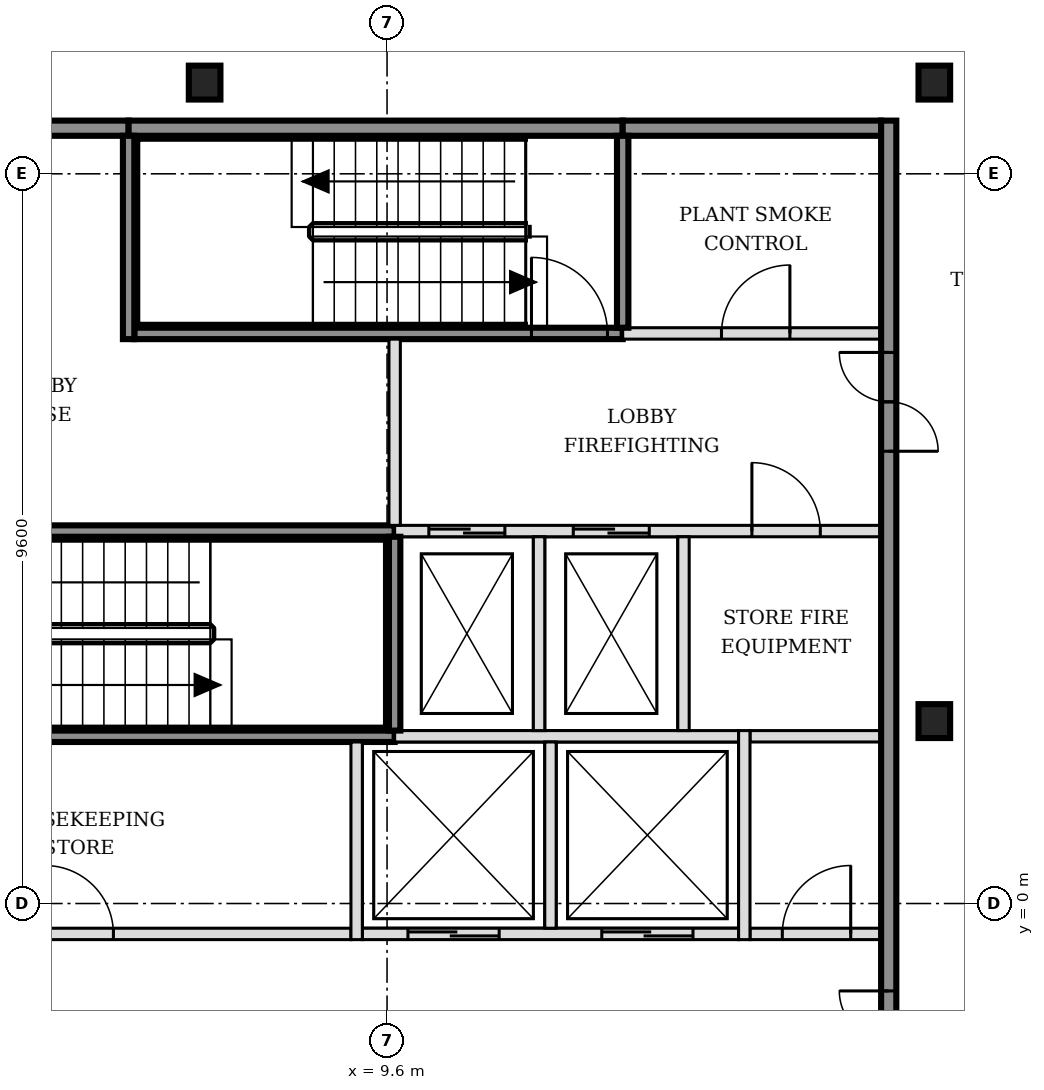
"""IFC4 building model, lengths in metres.
Left out: names, types, materials, properties, quantities, classifications, styles, units other than length and angle.
Written with IfcOpenShell. Run it as: python <this file> out.ifc"""

import sys

from ifc_helpers import new_model, si_unit, direction, frame, frame_2d, origin, origin_2d, place, context, subcontext, project, spatial, rectangle, i_section, extrude, element, fill, save


model = new_model("IFC4")
c1 = context("Model", 3, precision=1e-05, world=origin(), true_north=direction((0.0, 1.0)))
c2 = subcontext(c1, "Body", "Model", "MODEL_VIEW")
j1 = project(units=[si_unit("LENGTHUNIT", "METRE"), si_unit("PLANEANGLEUNIT", "RADIAN")], contexts=[c1])
p1 = place(None, origin())
s1 = spatial("IfcSite", under=j1, at=p1, CompositionType="ELEMENT")
p2 = place(p1, origin())
s2 = spatial("IfcBuilding", under=s1, at=p2, CompositionType="ELEMENT")
p3 = place(p2, frame((0.0, 0.0, 154.2)))
s3 = spatial("IfcBuildingStorey", under=s2, at=p3, CompositionType="ELEMENT", Elevation=154.2)
for number, where, z_axis, x_axis in (
    (1, (16.8, 2.4, -0.15), (0.0, 0.0, 1.0), (1.0, 0.0, 0.0)),
    (2, (7.2, 10.8, -0.15), (0.0, 0.0, 1.0), (1.0, 0.0, 0.0)),
    (3, (16.8, 10.8, -0.15), (0.0, 0.0, 1.0), (1.0, 0.0, 0.0)),
):
    element("IfcColumn", number, at=place(p3, frame(where, z_axis=z_axis, x_axis=x_axis)), inside=s3, PredefinedType="COLUMN", context=c2, shape_type="SweptSolid", body=[
        extrude(i_section(OverallWidth=0.416, OverallDepth=0.446, WebThickness=0.039, FlangeThickness=0.063, FilletRadius=0.015, at=origin_2d()), origin(), (0.0, 0.0, 1.0), 3.6),
    ])
p4 = place(p3, frame((-1.7, -0.4, 0.0), z_axis=(0.0, 0.0, 1.0), x_axis=(1.0, 0.0, 0.0)))
e4 = element("IfcWall", 4, at=p4, inside=s3, PredefinedType="PARTITIONING", context=c2, shape_type="SweptSolid", body=[
    extrude(rectangle(XDim=10.825, YDim=0.15, at=frame_2d((5.413, 0.0))), origin(), (0.0, 0.0, 1.0), 3.45),
])
p5 = place(p4, frame((1.3, 0.0, 0.0)))
e5 = element("IfcOpeningElement", 5, at=p5, cuts=e4, PredefinedType="OPENING", context=c2, shape_type="SweptSolid", body=[
    extrude(rectangle(XDim=0.9, YDim=2.1, at=frame_2d((0.45, 1.05))), frame((0.0, 0.085, 0.0), z_axis=(0.0, -1.0, 0.0), x_axis=(1.0, 0.0, 0.0)), (0.0, 0.0, 1.0), 0.17),
])
p6 = place(p4, frame((6.8, 0.0, 0.0)))
e6 = element("IfcOpeningElement", 6, at=p6, cuts=e4, PredefinedType="OPENING", context=c2, shape_type="SweptSolid", body=[
    extrude(rectangle(XDim=0.9, YDim=2.1, at=frame_2d((0.45, 1.05))), frame((0.0, 0.085, 0.0), z_axis=(0.0, -1.0, 0.0), x_axis=(1.0, 0.0, 0.0)), (0.0, 0.0, 1.0), 0.17),
])
p7 = place(p3, frame((9.275, -0.4, 0.0), z_axis=(0.0, 0.0, 1.0), x_axis=(1.0, 0.0, 0.0)))
e7 = element("IfcWall", 7, at=p7, inside=s3, PredefinedType="SOLIDWALL", context=c2, shape_type="SweptSolid", body=[
    extrude(rectangle(XDim=4.95, YDim=0.15, at=frame_2d((2.475, 0.0))), origin(), (0.0, 0.0, 1.0), 3.45),
])
p8 = place(p7, frame((0.6, 0.0, 0.0)))
e8 = element("IfcOpeningElement", 8, at=p8, cuts=e7, PredefinedType="OPENING", context=c2, shape_type="SweptSolid", body=[
    extrude(rectangle(XDim=1.2, YDim=2.1, at=frame_2d((0.6, 1.05))), frame((0.0, 0.085, 0.0), z_axis=(0.0, -1.0, 0.0), x_axis=(1.0, 0.0, 0.0)), (0.0, 0.0, 1.0), 0.17),
])
p9 = place(p7, frame((3.15, 0.0, 0.0)))
e9 = element("IfcOpeningElement", 9, at=p9, cuts=e7, PredefinedType="OPENING", context=c2, shape_type="SweptSolid", body=[
    extrude(rectangle(XDim=1.2, YDim=2.1, at=frame_2d((0.6, 1.05))), frame((0.0, 0.085, 0.0), z_axis=(0.0, -1.0, 0.0), x_axis=(1.0, 0.0, 0.0)), (0.0, 0.0, 1.0), 0.17),
])
p10 = place(p3, frame((14.375, -0.4, 0.0), z_axis=(0.0, 0.0, 1.0), x_axis=(1.0, 0.0, 0.0)))
e10 = element("IfcWall", 10, at=p10, inside=s3, PredefinedType="PARTITIONING", context=c2, shape_type="SweptSolid", body=[
    extrude(rectangle(XDim=1.725, YDim=0.15, at=frame_2d((0.863, 0.0))), origin(), (0.0, 0.0, 1.0), 3.45),
])
p11 = place(p10, frame((0.425, 0.0, 0.0)))
e11 = element("IfcOpeningElement", 11, at=p11, cuts=e10, PredefinedType="OPENING", context=c2, shape_type="SweptSolid", body=[
    extrude(rectangle(XDim=0.9, YDim=2.1, at=frame_2d((0.45, 1.05))), frame((0.0, 0.085, 0.0), z_axis=(0.0, -1.0, 0.0), x_axis=(1.0, 0.0, 0.0)), (0.0, 0.0, 1.0), 0.17),
])
p12 = place(p3, frame((3.2, 2.2, 0.0), z_axis=(0.0, 0.0, 1.0), x_axis=(1.0, 0.0, 0.0)))
e12 = element("IfcWall", 12, at=p12, inside=s3, PredefinedType="SOLIDWALL", context=c2, shape_type="SweptSolid", body=[
    extrude(rectangle(XDim=6.5, YDim=0.15, at=frame_2d((3.25, 0.0))), origin(), (0.0, 0.0, 1.0), 3.45),
])
p13 = place(p3, frame((9.7, 2.2, 0.0), z_axis=(0.0, 0.0, 1.0), x_axis=(1.0, 0.0, 0.0)))
e13 = element("IfcWall", 13, at=p13, inside=s3, PredefinedType="SOLIDWALL", context=c2, shape_type="SweptSolid", body=[
    extrude(rectangle(XDim=4.525, YDim=0.15, at=frame_2d((2.263, 0.0))), origin(), (0.0, 0.0, 1.0), 3.45),
])
p14 = place(p3, frame((14.375, 2.2, 0.0), z_axis=(0.0, 0.0, 1.0), x_axis=(1.0, 0.0, 0.0)))
e14 = element("IfcWall", 14, at=p14, inside=s3, PredefinedType="PARTITIONING", context=c2, shape_type="SweptSolid", body=[
    extrude(rectangle(XDim=1.725, YDim=0.15, at=frame_2d((0.863, 0.0))), origin(), (0.0, 0.0, 1.0), 3.45),
])
p15 = place(p3, frame((3.2, 4.9, 0.0), z_axis=(0.0, 0.0, 1.0), x_axis=(1.0, 0.0, 0.0)))
e15 = element("IfcWall", 15, at=p15, inside=s3, PredefinedType="SOLIDWALL", context=c2, shape_type="SweptSolid", body=[
    extrude(rectangle(XDim=6.5, YDim=0.15, at=frame_2d((3.25, 0.0))), origin(), (0.0, 0.0, 1.0), 3.45),
])
p16 = place(p15, frame((0.175, 0.0, 0.0)))
e16 = element("IfcOpeningElement", 16, at=p16, cuts=e15, PredefinedType="OPENING", context=c2, shape_type="SweptSolid", body=[
    extrude(rectangle(XDim=1.0, YDim=2.1, at=frame_2d((0.5, 1.05))), frame((0.0, 0.085, 0.0), z_axis=(0.0, -1.0, 0.0), x_axis=(1.0, 0.0, 0.0)), (0.0, 0.0, 1.0), 0.17),
])
p17 = place(p3, frame((9.7, 4.9, 0.0), z_axis=(0.0, 0.0, 1.0), x_axis=(1.0, 0.0, 0.0)))
e17 = element("IfcWall", 17, at=p17, inside=s3, PredefinedType="SOLIDWALL", context=c2, shape_type="SweptSolid", body=[
    extrude(rectangle(XDim=6.4, YDim=0.15, at=frame_2d((3.2, 0.0))), origin(), (0.0, 0.0, 1.0), 3.45),
])
p18 = place(p17, frame((0.45, 0.0, 0.0)))
e18 = element("IfcOpeningElement", 18, at=p18, cuts=e17, PredefinedType="OPENING", context=c2, shape_type="SweptSolid", body=[
    extrude(rectangle(XDim=1.0, YDim=2.1, at=frame_2d((0.5, 1.05))), frame((0.0, 0.085, 0.0), z_axis=(0.0, -1.0, 0.0), x_axis=(1.0, 0.0, 0.0)), (0.0, 0.0, 1.0), 0.17),
])
p19 = place(p17, frame((2.35, 0.0, 0.0)))
e19 = element("IfcOpeningElement", 19, at=p19, cuts=e17, PredefinedType="OPENING", context=c2, shape_type="SweptSolid", body=[
    extrude(rectangle(XDim=1.0, YDim=2.1, at=frame_2d((0.5, 1.05))), frame((0.0, 0.085, 0.0), z_axis=(0.0, -1.0, 0.0), x_axis=(1.0, 0.0, 0.0)), (0.0, 0.0, 1.0), 0.17),
])
p20 = place(p17, frame((4.7, 0.0, 0.0)))
e20 = element("IfcOpeningElement", 20, at=p20, cuts=e17, PredefinedType="OPENING", context=c2, shape_type="SweptSolid", body=[
    extrude(rectangle(XDim=0.9, YDim=2.1, at=frame_2d((0.45, 1.05))), frame((0.0, 0.085, 0.0), z_axis=(0.0, -1.0, 0.0), x_axis=(1.0, 0.0, 0.0)), (0.0, 0.0, 1.0), 0.17),
])
p21 = place(p3, frame((6.275, 7.5, 0.0), z_axis=(0.0, 0.0, 1.0), x_axis=(1.0, 0.0, 0.0)))
e21 = element("IfcWall", 21, at=p21, inside=s3, PredefinedType="SOLIDWALL", context=c2, shape_type="SweptSolid", body=[
    extrude(rectangle(XDim=6.425, YDim=0.15, at=frame_2d((3.212, 0.0))), origin(), (0.0, 0.0, 1.0), 3.45),
])
p22 = place(p21, frame((5.225, 0.0, 0.0)))
e22 = element("IfcOpeningElement", 22, at=p22, cuts=e21, PredefinedType="OPENING", context=c2, shape_type="SweptSolid", body=[
    extrude(rectangle(XDim=1.0, YDim=2.1, at=frame_2d((0.5, 1.05))), frame((0.0, 0.085, 0.0), z_axis=(0.0, -1.0, 0.0), x_axis=(1.0, 0.0, 0.0)), (0.0, 0.0, 1.0), 0.17),
])
p23 = place(p3, frame((12.7, 7.5, 0.0), z_axis=(0.0, 0.0, 1.0), x_axis=(1.0, 0.0, 0.0)))
e23 = element("IfcWall", 23, at=p23, inside=s3, PredefinedType="SOLIDWALL", context=c2, shape_type="SweptSolid", body=[
    extrude(rectangle(XDim=3.4, YDim=0.15, at=frame_2d((1.7, 0.0))), origin(), (0.0, 0.0, 1.0), 3.45),
])
p24 = place(p23, frame((1.3, 0.0, 0.0)))
e24 = element("IfcOpeningElement", 24, at=p24, cuts=e23, PredefinedType="OPENING", context=c2, shape_type="SweptSolid", body=[
    extrude(rectangle(XDim=0.9, YDim=2.1, at=frame_2d((0.45, 1.05))), frame((0.0, 0.085, 0.0), z_axis=(0.0, -1.0, 0.0), x_axis=(1.0, 0.0, 0.0)), (0.0, 0.0, 1.0), 0.17),
])
p25 = place(p3, frame((-1.7, 10.2, 0.0), z_axis=(0.0, 0.0, 1.0), x_axis=(1.0, 0.0, 0.0)))
e25 = element("IfcWall", 25, at=p25, inside=s3, PredefinedType="SOLIDWALL", context=c2, shape_type="SweptSolid", body=[
    extrude(rectangle(XDim=7.9, YDim=0.2, at=frame_2d((3.95, 0.0))), origin(), (0.0, 0.0, 1.0), 3.45),
])
p26 = place(p3, frame((6.2, 10.2, 0.0), z_axis=(0.0, 0.0, 1.0), x_axis=(1.0, 0.0, 0.0)))
e26 = element("IfcWall", 26, at=p26, inside=s3, PredefinedType="SOLIDWALL", context=c2, shape_type="SweptSolid", body=[
    extrude(rectangle(XDim=6.5, YDim=0.2, at=frame_2d((3.25, 0.0))), origin(), (0.0, 0.0, 1.0), 3.45),
])
p27 = place(p3, frame((12.7, 10.2, 0.0), z_axis=(0.0, 0.0, 1.0), x_axis=(1.0, 0.0, 0.0)))
e27 = element("IfcWall", 27, at=p27, inside=s3, PredefinedType="SOLIDWALL", context=c2, shape_type="SweptSolid", body=[
    extrude(rectangle(XDim=3.4, YDim=0.2, at=frame_2d((1.7, 0.0))), origin(), (0.0, 0.0, 1.0), 3.45),
])
p28 = place(p3, frame((6.2, 7.425, 0.0), z_axis=(0.0, 0.0, 1.0), x_axis=(0.0, 1.0, 0.0)))
e28 = element("IfcWall", 28, at=p28, inside=s3, PredefinedType="SOLIDWALL", context=c2, shape_type="SweptSolid", body=[
    extrude(rectangle(XDim=2.675, YDim=0.15, at=frame_2d((1.337, 0.0))), origin(), (0.0, 0.0, 1.0), 3.45),
])
p29 = place(p3, frame((9.2, -0.475, 0.0), z_axis=(0.0, 0.0, 1.0), x_axis=(0.0, 1.0, 0.0)))
e29 = element("IfcWall", 29, at=p29, inside=s3, PredefinedType="SOLIDWALL", context=c2, shape_type="SweptSolid", body=[
    extrude(rectangle(XDim=2.6, YDim=0.15, at=frame_2d((1.3, 0.0))), origin(), (0.0, 0.0, 1.0), 3.45),
])
p30 = place(p3, frame((9.7, 2.275, 0.0), z_axis=(0.0, 0.0, 1.0), x_axis=(0.0, 1.0, 0.0)))
e30 = element("IfcWall", 30, at=p30, inside=s3, PredefinedType="SOLIDWALL", context=c2, shape_type="SweptSolid", body=[
    extrude(rectangle(XDim=2.55, YDim=0.15, at=frame_2d((1.275, 0.0))), origin(), (0.0, 0.0, 1.0), 3.45),
])
p31 = place(p3, frame((9.7, 4.975, 0.0), z_axis=(0.0, 0.0, 1.0), x_axis=(0.0, 1.0, 0.0)))
e31 = element("IfcWall", 31, at=p31, inside=s3, PredefinedType="SOLIDWALL", context=c2, shape_type="SweptSolid", body=[
    extrude(rectangle(XDim=2.45, YDim=0.15, at=frame_2d((1.225, 0.0))), origin(), (0.0, 0.0, 1.0), 3.45),
])
p32 = place(p3, frame((11.6, 2.275, 0.0), z_axis=(0.0, 0.0, 1.0), x_axis=(0.0, 1.0, 0.0)))
e32 = element("IfcWall", 32, at=p32, inside=s3, PredefinedType="SOLIDWALL", context=c2, shape_type="SweptSolid", body=[
    extrude(rectangle(XDim=2.55, YDim=0.15, at=frame_2d((1.275, 0.0))), origin(), (0.0, 0.0, 1.0), 3.45),
])
p33 = place(p3, frame((11.75, -0.325, 0.0), z_axis=(0.0, 0.0, 1.0), x_axis=(0.0, 1.0, 0.0)))
e33 = element("IfcWall", 33, at=p33, inside=s3, PredefinedType="SOLIDWALL", context=c2, shape_type="SweptSolid", body=[
    extrude(rectangle(XDim=2.45, YDim=0.15, at=frame_2d((1.225, 0.0))), origin(), (0.0, 0.0, 1.0), 3.45),
])
p34 = place(p3, frame((12.7, 7.575, 0.0), z_axis=(0.0, 0.0, 1.0), x_axis=(0.0, 1.0, 0.0)))
e34 = element("IfcWall", 34, at=p34, inside=s3, PredefinedType="SOLIDWALL", context=c2, shape_type="SweptSolid", body=[
    extrude(rectangle(XDim=2.525, YDim=0.15, at=frame_2d((1.263, 0.0))), origin(), (0.0, 0.0, 1.0), 3.45),
])
p35 = place(p3, frame((13.5, 2.275, 0.0), z_axis=(0.0, 0.0, 1.0), x_axis=(0.0, 1.0, 0.0)))
e35 = element("IfcWall", 35, at=p35, inside=s3, PredefinedType="SOLIDWALL", context=c2, shape_type="SweptSolid", body=[
    extrude(rectangle(XDim=2.55, YDim=0.15, at=frame_2d((1.275, 0.0))), origin(), (0.0, 0.0, 1.0), 3.45),
])
p36 = place(p3, frame((14.3, -0.475, 0.0), z_axis=(0.0, 0.0, 1.0), x_axis=(0.0, 1.0, 0.0)))
e36 = element("IfcWall", 36, at=p36, inside=s3, PredefinedType="SOLIDWALL", context=c2, shape_type="SweptSolid", body=[
    extrude(rectangle(XDim=2.75, YDim=0.15, at=frame_2d((1.375, 0.0))), origin(), (0.0, 0.0, 1.0), 3.45),
])
p37 = place(p3, frame((16.2, -5.5, 0.0), z_axis=(0.0, 0.0, 1.0), x_axis=(0.0, 1.0, 0.0)))
e37 = element("IfcWall", 37, at=p37, inside=s3, PredefinedType="SOLIDWALL", context=c2, shape_type="SweptSolid", body=[
    extrude(rectangle(XDim=15.8, YDim=0.2, at=frame_2d((7.9, 0.0))), origin(), (0.0, 0.0, 1.0), 3.45),
])
p38 = place(p37, frame((3.05, 0.0, 0.0)))
e38 = element("IfcOpeningElement", 38, at=p38, cuts=e37, PredefinedType="OPENING", context=c2, shape_type="SweptSolid", body=[
    extrude(rectangle(XDim=1.3, YDim=2.1, at=frame_2d((0.65, 1.05))), frame((0.0, 0.11, 0.0), z_axis=(0.0, -1.0, 0.0), x_axis=(1.0, 0.0, 0.0)), (0.0, 0.0, 1.0), 0.22),
])
p39 = place(p37, frame((11.45, 0.0, 0.0)))
e39 = element("IfcOpeningElement", 39, at=p39, cuts=e37, PredefinedType="OPENING", context=c2, shape_type="SweptSolid", body=[
    extrude(rectangle(XDim=1.3, YDim=2.1, at=frame_2d((0.65, 1.05))), frame((0.0, 0.11, 0.0), z_axis=(0.0, -1.0, 0.0), x_axis=(1.0, 0.0, 0.0)), (0.0, 0.0, 1.0), 0.22),
])
p40 = place(p3, frame((26.272, 9.522, 0.0), z_axis=(0.0, 0.0, 1.0), x_axis=(-0.707097742657, 0.707115819601, 0.0)))
e40 = element("IfcWall", 40, at=p40, inside=s3, PredefinedType="PARTITIONING", context=c2, shape_type="SweptSolid", body=[
    extrude(rectangle(XDim=13.506, YDim=0.15, at=frame_2d((6.753, 0.0))), origin(), (0.0, 0.0, 1.0), 2.73),
])
p41 = place(p40, frame((1.398, 0.0, 0.0)))
e41 = element("IfcOpeningElement", 41, at=p41, cuts=e40, PredefinedType="OPENING", context=c2, shape_type="SweptSolid", body=[
    extrude(rectangle(XDim=0.9, YDim=2.1, at=frame_2d((0.45, 1.05))), frame((0.0, 0.085, 0.0), z_axis=(0.0, -1.0, 0.0), x_axis=(1.0, 0.0, 0.0)), (0.0, 0.0, 1.0), 0.17),
])
p42 = place(p40, frame((4.668, 0.0, 0.0)))
e42 = element("IfcOpeningElement", 42, at=p42, cuts=e40, PredefinedType="OPENING", context=c2, shape_type="SweptSolid", body=[
    extrude(rectangle(XDim=0.9, YDim=2.1, at=frame_2d((0.45, 1.05))), frame((0.0, 0.085, 0.0), z_axis=(0.0, -1.0, 0.0), x_axis=(1.0, 0.0, 0.0)), (0.0, 0.0, 1.0), 0.17),
])
p43 = place(p40, frame((7.938, 0.0, 0.0)))
e43 = element("IfcOpeningElement", 43, at=p43, cuts=e40, PredefinedType="OPENING", context=c2, shape_type="SweptSolid", body=[
    extrude(rectangle(XDim=0.9, YDim=2.1, at=frame_2d((0.45, 1.05))), frame((0.0, 0.085, 0.0), z_axis=(0.0, -1.0, 0.0), x_axis=(1.0, 0.0, 0.0)), (0.0, 0.0, 1.0), 0.17),
])
p44 = place(p40, frame((11.405, 0.0, 0.0)))
e44 = element("IfcOpeningElement", 44, at=p44, cuts=e40, PredefinedType="OPENING", context=c2, shape_type="SweptSolid", body=[
    extrude(rectangle(XDim=0.9, YDim=2.1, at=frame_2d((0.45, 1.05))), frame((0.0, 0.085, 0.0), z_axis=(0.0, -1.0, 0.0), x_axis=(1.0, 0.0, 0.0)), (0.0, 0.0, 1.0), 0.17),
])
p45 = place(p8, origin())
e45 = element("IfcDoor", 45, at=p45, inside=s3, OperationType="DOUBLE_DOOR_SLIDING", PredefinedType="DOOR", context=c2, shape_type="SweptSolid", body=[
    extrude(rectangle(XDim=1.2, YDim=2.1, at=frame_2d((0.6, 1.05))), frame((0.0, 0.025, 0.0), z_axis=(0.0, -1.0, 0.0), x_axis=(1.0, 0.0, 0.0)), (0.0, 0.0, 1.0), 0.05),
])
fill(e8, e45)
p46 = place(p9, origin())
e46 = element("IfcDoor", 46, at=p46, inside=s3, OperationType="DOUBLE_DOOR_SLIDING", PredefinedType="DOOR", context=c2, shape_type="SweptSolid", body=[
    extrude(rectangle(XDim=1.2, YDim=2.1, at=frame_2d((0.6, 1.05))), frame((0.0, 0.025, 0.0), z_axis=(0.0, -1.0, 0.0), x_axis=(1.0, 0.0, 0.0)), (0.0, 0.0, 1.0), 0.05),
])
fill(e9, e46)
p47 = place(p18, origin())
e47 = element("IfcDoor", 47, at=p47, inside=s3, OperationType="DOUBLE_DOOR_SLIDING", PredefinedType="DOOR", context=c2, shape_type="SweptSolid", body=[
    extrude(rectangle(XDim=1.0, YDim=2.1, at=frame_2d((0.5, 1.05))), frame((0.0, 0.025, 0.0), z_axis=(0.0, -1.0, 0.0), x_axis=(1.0, 0.0, 0.0)), (0.0, 0.0, 1.0), 0.05),
])
fill(e18, e47)
p48 = place(p19, origin())
e48 = element("IfcDoor", 48, at=p48, inside=s3, OperationType="DOUBLE_DOOR_SLIDING", PredefinedType="DOOR", context=c2, shape_type="SweptSolid", body=[
    extrude(rectangle(XDim=1.0, YDim=2.1, at=frame_2d((0.5, 1.05))), frame((0.0, 0.025, 0.0), z_axis=(0.0, -1.0, 0.0), x_axis=(1.0, 0.0, 0.0)), (0.0, 0.0, 1.0), 0.05),
])
fill(e19, e48)
p49 = place(p22, origin())
e49 = element("IfcDoor", 49, at=p49, inside=s3, OperationType="SINGLE_SWING_LEFT", PredefinedType="DOOR", context=c2, shape_type="SweptSolid", body=[
    extrude(rectangle(XDim=1.0, YDim=2.1, at=frame_2d((0.5, 1.05))), frame((0.0, 0.025, 0.0), z_axis=(0.0, -1.0, 0.0), x_axis=(1.0, 0.0, 0.0)), (0.0, 0.0, 1.0), 0.05),
])
fill(e22, e49)
p50 = place(p38, origin())
e50 = element("IfcDoor", 50, at=p50, inside=s3, OperationType="DOUBLE_DOOR_SINGLE_SWING", PredefinedType="DOOR", context=c2, shape_type="SweptSolid", body=[
    extrude(rectangle(XDim=1.3, YDim=2.1, at=frame_2d((0.65, 1.05))), frame((0.0, 0.025, 0.0), z_axis=(0.0, -1.0, 0.0), x_axis=(1.0, 0.0, 0.0)), (0.0, 0.0, 1.0), 0.05),
])
fill(e38, e50)
p51 = place(p39, origin())
e51 = element("IfcDoor", 51, at=p51, inside=s3, OperationType="DOUBLE_DOOR_SINGLE_SWING", PredefinedType="DOOR", context=c2, shape_type="SweptSolid", body=[
    extrude(rectangle(XDim=1.3, YDim=2.1, at=frame_2d((0.65, 1.05))), frame((0.0, 0.025, 0.0), z_axis=(0.0, -1.0, 0.0), x_axis=(1.0, 0.0, 0.0)), (0.0, 0.0, 1.0), 0.05),
])
fill(e39, e51)
p52 = place(p11, origin())
e52 = element("IfcDoor", 52, at=p52, inside=s3, OperationType="SINGLE_SWING_RIGHT", PredefinedType="DOOR", context=c2, shape_type="SweptSolid", body=[
    extrude(rectangle(XDim=0.9, YDim=2.1, at=frame_2d((0.45, 1.05))), frame((0.0, 0.025, 0.0), z_axis=(0.0, -1.0, 0.0), x_axis=(1.0, 0.0, 0.0)), (0.0, 0.0, 1.0), 0.05),
])
fill(e11, e52)
p53 = place(p20, origin())
e53 = element("IfcDoor", 53, at=p53, inside=s3, OperationType="SINGLE_SWING_LEFT", PredefinedType="DOOR", context=c2, shape_type="SweptSolid", body=[
    extrude(rectangle(XDim=0.9, YDim=2.1, at=frame_2d((0.45, 1.05))), frame((0.0, 0.025, 0.0), z_axis=(0.0, -1.0, 0.0), x_axis=(1.0, 0.0, 0.0)), (0.0, 0.0, 1.0), 0.05),
])
fill(e20, e53)
p54 = place(p24, origin())
e54 = element("IfcDoor", 54, at=p54, inside=s3, OperationType="SINGLE_SWING_RIGHT", PredefinedType="DOOR", context=c2, shape_type="SweptSolid", body=[
    extrude(rectangle(XDim=0.9, YDim=2.1, at=frame_2d((0.45, 1.05))), frame((0.0, 0.025, 0.0), z_axis=(0.0, -1.0, 0.0), x_axis=(1.0, 0.0, 0.0)), (0.0, 0.0, 1.0), 0.05),
])
fill(e24, e54)
p55 = place(p6, origin())
e55 = element("IfcDoor", 55, at=p55, inside=s3, OperationType="SINGLE_SWING_LEFT", PredefinedType="DOOR", context=c2, shape_type="SweptSolid", body=[
    extrude(rectangle(XDim=0.9, YDim=2.1, at=frame_2d((0.45, 1.05))), frame((0.0, 0.025, 0.0), z_axis=(0.0, -1.0, 0.0), x_axis=(1.0, 0.0, 0.0)), (0.0, 0.0, 1.0), 0.05),
])
fill(e6, e55)
save(model, sys.argv[1])
